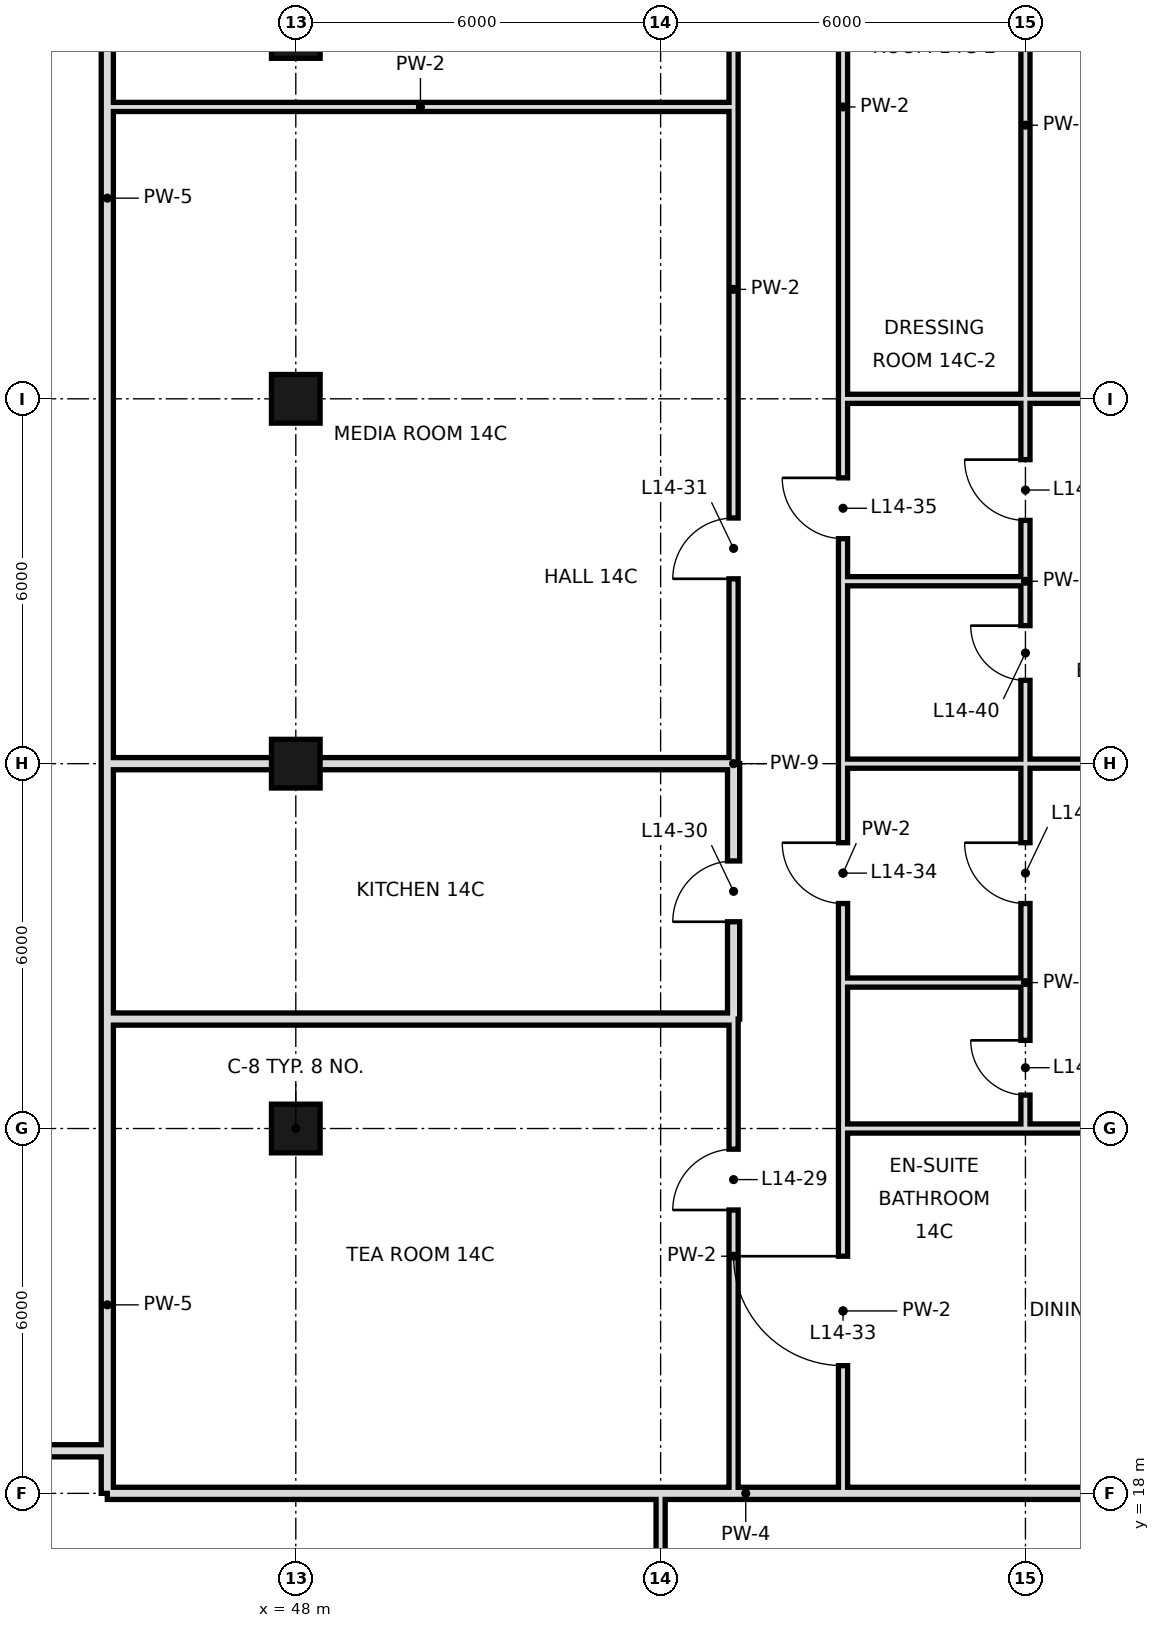
"""IFC4 building model, lengths in metres.
Left out: names, types, materials, properties, quantities, classifications, styles, units other than length and angle.
Written with IfcOpenShell. Run it as: python <this file> out.ifc"""

import sys

from ifc_helpers import new_model, si_unit, direction, frame, frame_2d, origin, origin_2d, place, context, subcontext, project, spatial, rectangle, hollow_rectangle, extrude, element, fill, save


model = new_model("IFC4")
c1 = context("Model", 3, precision=1e-05, world=origin(), true_north=direction((0.0, 1.0)))
c2 = subcontext(c1, "Body", "Model", "MODEL_VIEW")
j1 = project(units=[si_unit("LENGTHUNIT", "METRE"), si_unit("PLANEANGLEUNIT", "RADIAN")], contexts=[c1])
p1 = place(None, origin())
s1 = spatial("IfcSite", under=j1, at=p1, CompositionType="ELEMENT")
p2 = place(p1, origin())
s2 = spatial("IfcBuilding", under=s1, at=p2, CompositionType="ELEMENT")
p3 = place(p2, frame((0.0, 0.0, 71.4)))
s3 = spatial("IfcBuildingStorey", under=s2, at=p3, CompositionType="ELEMENT", Elevation=71.4)
for number, where, z_axis, x_axis in (
    (1, (48.0, 24.0, 0.0), (0.0, 0.0, 1.0), (1.0, 0.0, 0.0)),
    (2, (48.0, 30.0, 0.0), (0.0, 0.0, 1.0), (1.0, 0.0, 0.0)),
    (3, (48.0, 36.0, 0.0), (0.0, 0.0, 1.0), (1.0, 0.0, 0.0)),
    (4, (48.0, 42.0, 0.0), (0.0, 0.0, 1.0), (1.0, 0.0, 0.0)),
):
    element("IfcColumn", number, at=place(p3, frame(where, z_axis=z_axis, x_axis=x_axis)), inside=s3, PredefinedType="COLUMN", context=c2, shape_type="SweptSolid", body=[
        extrude(hollow_rectangle(XDim=0.8, YDim=0.8, WallThickness=0.04, at=origin_2d()), origin(), (0.0, 0.0, 1.0), 3.6),
    ])
p4 = place(p3, frame((44.9, 18.7, 0.0), z_axis=(0.0, 0.0, 1.0), x_axis=(0.0, 1.0, 0.0)))
e5 = element("IfcWall", 5, at=p4, inside=s3, PredefinedType="SOLIDWALL", context=c2, shape_type="SweptSolid", body=[
    extrude(rectangle(XDim=7.1, YDim=0.2, at=frame_2d((3.55, 0.0))), origin(), (0.0, 0.0, 1.0), 3.42),
])
p5 = place(p3, frame((44.9, 30.0, 0.0), z_axis=(0.0, 0.0, 1.0), x_axis=(0.0, 1.0, 0.0)))
e6 = element("IfcWall", 6, at=p5, inside=s3, PredefinedType="SOLIDWALL", context=c2, shape_type="SweptSolid", body=[
    extrude(rectangle(XDim=18.6, YDim=0.2, at=frame_2d((9.3, 0.0))), origin(), (0.0, 0.0, 1.0), 2.72),
])
p6 = place(p5, frame((12.6, 0.0, 0.0)))
e7 = element("IfcOpeningElement", 7, at=p6, cuts=e6, PredefinedType="OPENING", context=c2, shape_type="SweptSolid", body=[
    extrude(rectangle(XDim=1.2, YDim=2.4, at=frame_2d((0.6, 1.2))), frame((0.0, 0.11, 0.0), z_axis=(0.0, -1.0, 0.0), x_axis=(1.0, 0.0, 0.0)), (0.0, 0.0, 1.0), 0.22),
])
p7 = place(p3, frame((44.9, 25.8, 0.0), z_axis=(0.0, 0.0, 1.0), x_axis=(0.0, 1.0, 0.0)))
e8 = element("IfcWall", 8, at=p7, inside=s3, PredefinedType="SOLIDWALL", context=c2, shape_type="SweptSolid", body=[
    extrude(rectangle(XDim=4.2, YDim=0.2, at=frame_2d((2.1, 0.0))), origin(), (0.0, 0.0, 1.0), 2.97),
])
p8 = place(p3, frame((44.9, 18.0, 0.0), z_axis=(0.0, 0.0, 1.0), x_axis=(0.0, 1.0, 0.0)))
e9 = element("IfcWall", 9, at=p8, inside=s3, PredefinedType="SOLIDWALL", context=c2, shape_type="SweptSolid", body=[
    extrude(rectangle(XDim=0.7, YDim=0.2, at=frame_2d((0.35, 0.0))), origin(), (0.0, 0.0, 1.0), 2.97),
])
p9 = place(p3, frame((54.0, 10.8, 0.0), z_axis=(0.0, 0.0, 1.0), x_axis=(0.0, 1.0, 0.0)))
e10 = element("IfcWall", 10, at=p9, inside=s3, PredefinedType="PARTITIONING", context=c2, shape_type="SweptSolid", body=[
    extrude(rectangle(XDim=7.2, YDim=0.15, at=frame_2d((3.6, 0.0))), origin(), (0.0, 0.0, 1.0), 3.42),
])
p10 = place(p3, frame((55.2, 25.8, 0.0), z_axis=(0.0, 0.0, 1.0), x_axis=(0.0, 1.0, 0.0)))
e11 = element("IfcWall", 11, at=p10, inside=s3, PredefinedType="SOLIDWALL", context=c2, shape_type="SweptSolid", body=[
    extrude(rectangle(XDim=4.2, YDim=0.2, at=frame_2d((2.1, 0.0))), origin(), (0.0, 0.0, 1.0), 2.52),
])
p11 = place(p10, frame((1.6, 0.0, 0.0)))
e12 = element("IfcOpeningElement", 12, at=p11, cuts=e11, PredefinedType="OPENING", context=c2, shape_type="SweptSolid", body=[
    extrude(rectangle(XDim=1.0, YDim=2.4, at=frame_2d((0.5, 1.2))), frame((0.0, 0.11, 0.0), z_axis=(0.0, -1.0, 0.0), x_axis=(1.0, 0.0, 0.0)), (0.0, 0.0, 1.0), 0.22),
])
p12 = place(p3, frame((55.2, 18.0, 0.0), z_axis=(0.0, 0.0, 1.0), x_axis=(0.0, 1.0, 0.0)))
e13 = element("IfcWall", 13, at=p12, inside=s3, PredefinedType="PARTITIONING", context=c2, shape_type="SweptSolid", body=[
    extrude(rectangle(XDim=7.8, YDim=0.15, at=frame_2d((3.9, 0.0))), origin(), (0.0, 0.0, 1.0), 3.42),
])
p13 = place(p12, frame((4.66, 0.0, 0.0)))
e14 = element("IfcOpeningElement", 14, at=p13, cuts=e13, PredefinedType="OPENING", context=c2, shape_type="SweptSolid", body=[
    extrude(rectangle(XDim=1.0, YDim=2.4, at=frame_2d((0.5, 1.2))), frame((0.0, 0.085, 0.0), z_axis=(0.0, -1.0, 0.0), x_axis=(1.0, 0.0, 0.0)), (0.0, 0.0, 1.0), 0.17),
])
p14 = place(p3, frame((55.2, 30.0, 0.0), z_axis=(0.0, 0.0, 1.0), x_axis=(0.0, 1.0, 0.0)))
e15 = element("IfcWall", 15, at=p14, inside=s3, PredefinedType="PARTITIONING", context=c2, shape_type="SweptSolid", body=[
    extrude(rectangle(XDim=15.6, YDim=0.15, at=frame_2d((7.8, 0.0))), origin(), (0.0, 0.0, 1.0), 3.42),
])
p15 = place(p14, frame((12.7, 0.0, 0.0)))
e16 = element("IfcOpeningElement", 16, at=p15, cuts=e15, PredefinedType="OPENING", context=c2, shape_type="SweptSolid", body=[
    extrude(rectangle(XDim=1.0, YDim=2.4, at=frame_2d((0.5, 1.2))), frame((0.0, 0.085, 0.0), z_axis=(0.0, -1.0, 0.0), x_axis=(1.0, 0.0, 0.0)), (0.0, 0.0, 1.0), 0.17),
])
p16 = place(p14, frame((3.04, 0.0, 0.0)))
e17 = element("IfcOpeningElement", 17, at=p16, cuts=e15, PredefinedType="OPENING", context=c2, shape_type="SweptSolid", body=[
    extrude(rectangle(XDim=1.0, YDim=2.4, at=frame_2d((0.5, 1.2))), frame((0.0, 0.085, 0.0), z_axis=(0.0, -1.0, 0.0), x_axis=(1.0, 0.0, 0.0)), (0.0, 0.0, 1.0), 0.17),
])
p17 = place(p3, frame((57.0, 18.0, 0.0), z_axis=(0.0, 0.0, 1.0), x_axis=(0.0, 1.0, 0.0)))
e18 = element("IfcWall", 18, at=p17, inside=s3, PredefinedType="PARTITIONING", context=c2, shape_type="SweptSolid", body=[
    extrude(rectangle(XDim=6.0, YDim=0.15, at=frame_2d((3.0, 0.0))), origin(), (0.0, 0.0, 1.0), 3.42),
])
p18 = place(p17, frame((2.1, 0.0, 0.0)))
e19 = element("IfcOpeningElement", 19, at=p18, cuts=e18, PredefinedType="OPENING", context=c2, shape_type="SweptSolid", body=[
    extrude(rectangle(XDim=1.8, YDim=2.4, at=frame_2d((0.9, 1.2))), frame((0.0, 0.085, 0.0), z_axis=(0.0, -1.0, 0.0), x_axis=(1.0, 0.0, 0.0)), (0.0, 0.0, 1.0), 0.17),
])
p19 = place(p3, frame((57.0, 26.4, 0.0), z_axis=(0.0, 0.0, 1.0), x_axis=(0.0, 1.0, 0.0)))
e20 = element("IfcWall", 20, at=p19, inside=s3, PredefinedType="PARTITIONING", context=c2, shape_type="SweptSolid", body=[
    extrude(rectangle(XDim=3.6, YDim=0.15, at=frame_2d((1.8, 0.0))), origin(), (0.0, 0.0, 1.0), 3.42),
])
p20 = place(p19, frame((1.3, 0.0, 0.0)))
e21 = element("IfcOpeningElement", 21, at=p20, cuts=e20, PredefinedType="OPENING", context=c2, shape_type="SweptSolid", body=[
    extrude(rectangle(XDim=1.0, YDim=2.4, at=frame_2d((0.5, 1.2))), frame((0.0, 0.085, 0.0), z_axis=(0.0, -1.0, 0.0), x_axis=(1.0, 0.0, 0.0)), (0.0, 0.0, 1.0), 0.17),
])
p21 = place(p3, frame((57.0, 33.0, 0.0), z_axis=(0.0, 0.0, 1.0), x_axis=(0.0, 1.0, 0.0)))
e22 = element("IfcWall", 22, at=p21, inside=s3, PredefinedType="PARTITIONING", context=c2, shape_type="SweptSolid", body=[
    extrude(rectangle(XDim=15.6, YDim=0.15, at=frame_2d((7.8, 0.0))), origin(), (0.0, 0.0, 1.0), 3.42),
])
p22 = place(p21, frame((0.7, 0.0, 0.0)))
e23 = element("IfcOpeningElement", 23, at=p22, cuts=e22, PredefinedType="OPENING", context=c2, shape_type="SweptSolid", body=[
    extrude(rectangle(XDim=1.0, YDim=2.4, at=frame_2d((0.5, 1.2))), frame((0.0, 0.085, 0.0), z_axis=(0.0, -1.0, 0.0), x_axis=(1.0, 0.0, 0.0)), (0.0, 0.0, 1.0), 0.17),
])
p23 = place(p21, frame((10.04, 0.0, 0.0)))
e24 = element("IfcOpeningElement", 24, at=p23, cuts=e22, PredefinedType="OPENING", context=c2, shape_type="SweptSolid", body=[
    extrude(rectangle(XDim=1.8, YDim=2.4, at=frame_2d((0.9, 1.2))), frame((0.0, 0.085, 0.0), z_axis=(0.0, -1.0, 0.0), x_axis=(1.0, 0.0, 0.0)), (0.0, 0.0, 1.0), 0.17),
])
p24 = place(p3, frame((57.0, 24.0, 0.0), z_axis=(0.0, 0.0, 1.0), x_axis=(0.0, 1.0, 0.0)))
e25 = element("IfcWall", 25, at=p24, inside=s3, PredefinedType="PARTITIONING", context=c2, shape_type="SweptSolid", body=[
    extrude(rectangle(XDim=2.4, YDim=0.15, at=frame_2d((1.2, 0.0))), origin(), (0.0, 0.0, 1.0), 3.42),
])
p25 = place(p3, frame((57.0, 30.0, 0.0), z_axis=(0.0, 0.0, 1.0), x_axis=(0.0, 1.0, 0.0)))
e26 = element("IfcWall", 26, at=p25, inside=s3, PredefinedType="PARTITIONING", context=c2, shape_type="SweptSolid", body=[
    extrude(rectangle(XDim=3.0, YDim=0.15, at=frame_2d((1.5, 0.0))), origin(), (0.0, 0.0, 1.0), 3.42),
])
p26 = place(p3, frame((60.0, 26.4, 0.0), z_axis=(0.0, 0.0, 1.0), x_axis=(0.0, 1.0, 0.0)))
e27 = element("IfcWall", 27, at=p26, inside=s3, PredefinedType="PARTITIONING", context=c2, shape_type="SweptSolid", body=[
    extrude(rectangle(XDim=3.6, YDim=0.15, at=frame_2d((1.8, 0.0))), origin(), (0.0, 0.0, 1.0), 3.42),
])
p27 = place(p26, frame((1.3, 0.0, 0.0)))
e28 = element("IfcOpeningElement", 28, at=p27, cuts=e27, PredefinedType="OPENING", context=c2, shape_type="SweptSolid", body=[
    extrude(rectangle(XDim=1.0, YDim=2.4, at=frame_2d((0.5, 1.2))), frame((0.0, 0.085, 0.0), z_axis=(0.0, -1.0, 0.0), x_axis=(1.0, 0.0, 0.0)), (0.0, 0.0, 1.0), 0.17),
])
p28 = place(p3, frame((60.0, 33.0, 0.0), z_axis=(0.0, 0.0, 1.0), x_axis=(0.0, 1.0, 0.0)))
e29 = element("IfcWall", 29, at=p28, inside=s3, PredefinedType="PARTITIONING", context=c2, shape_type="SweptSolid", body=[
    extrude(rectangle(XDim=15.0, YDim=0.15, at=frame_2d((7.5, 0.0))), origin(), (0.0, 0.0, 1.0), 3.42),
])
p29 = place(p28, frame((1.0, 0.0, 0.0)))
e30 = element("IfcOpeningElement", 30, at=p29, cuts=e29, PredefinedType="OPENING", context=c2, shape_type="SweptSolid", body=[
    extrude(rectangle(XDim=1.0, YDim=2.4, at=frame_2d((0.5, 1.2))), frame((0.0, 0.085, 0.0), z_axis=(0.0, -1.0, 0.0), x_axis=(1.0, 0.0, 0.0)), (0.0, 0.0, 1.0), 0.17),
])
p30 = place(p28, frame((10.04, 0.0, 0.0)))
e31 = element("IfcOpeningElement", 31, at=p30, cuts=e29, PredefinedType="OPENING", context=c2, shape_type="SweptSolid", body=[
    extrude(rectangle(XDim=1.8, YDim=2.4, at=frame_2d((0.9, 1.2))), frame((0.0, 0.085, 0.0), z_axis=(0.0, -1.0, 0.0), x_axis=(1.0, 0.0, 0.0)), (0.0, 0.0, 1.0), 0.17),
])
p31 = place(p3, frame((60.0, 24.0, 0.0), z_axis=(0.0, 0.0, 1.0), x_axis=(0.0, 1.0, 0.0)))
e32 = element("IfcWall", 32, at=p31, inside=s3, PredefinedType="PARTITIONING", context=c2, shape_type="SweptSolid", body=[
    extrude(rectangle(XDim=2.4, YDim=0.15, at=frame_2d((1.2, 0.0))), origin(), (0.0, 0.0, 1.0), 3.42),
])
p32 = place(p31, frame((0.55, 0.0, 0.0)))
e33 = element("IfcOpeningElement", 33, at=p32, cuts=e32, PredefinedType="OPENING", context=c2, shape_type="SweptSolid", body=[
    extrude(rectangle(XDim=0.9, YDim=2.4, at=frame_2d((0.45, 1.2))), frame((0.0, 0.085, 0.0), z_axis=(0.0, -1.0, 0.0), x_axis=(1.0, 0.0, 0.0)), (0.0, 0.0, 1.0), 0.17),
])
p33 = place(p3, frame((60.0, 30.0, 0.0), z_axis=(0.0, 0.0, 1.0), x_axis=(0.0, 1.0, 0.0)))
e34 = element("IfcWall", 34, at=p33, inside=s3, PredefinedType="PARTITIONING", context=c2, shape_type="SweptSolid", body=[
    extrude(rectangle(XDim=3.0, YDim=0.15, at=frame_2d((1.5, 0.0))), origin(), (0.0, 0.0, 1.0), 3.42),
])
p34 = place(p33, frame((1.37, 0.0, 0.0)))
e35 = element("IfcOpeningElement", 35, at=p34, cuts=e34, PredefinedType="OPENING", context=c2, shape_type="SweptSolid", body=[
    extrude(rectangle(XDim=0.9, YDim=2.4, at=frame_2d((0.45, 1.2))), frame((0.0, 0.085, 0.0), z_axis=(0.0, -1.0, 0.0), x_axis=(1.0, 0.0, 0.0)), (0.0, 0.0, 1.0), 0.17),
])
p35 = place(p3, frame((44.9, 18.0, 0.0), z_axis=(0.0, 0.0, 1.0), x_axis=(1.0, 0.0, 0.0)))
e36 = element("IfcWall", 36, at=p35, inside=s3, PredefinedType="SOLIDWALL", context=c2, shape_type="SweptSolid", body=[
    extrude(rectangle(XDim=21.7, YDim=0.2, at=frame_2d((10.85, 0.0))), origin(), (0.0, 0.0, 1.0), 2.52),
])
p36 = place(p3, frame((42.6, 18.7, 0.0), z_axis=(0.0, 0.0, 1.0), x_axis=(1.0, 0.0, 0.0)))
e37 = element("IfcWall", 37, at=p36, inside=s3, PredefinedType="SOLIDWALL", context=c2, shape_type="SweptSolid", body=[
    extrude(rectangle(XDim=2.3, YDim=0.2, at=frame_2d((1.15, 0.0))), origin(), (0.0, 0.0, 1.0), 3.42),
])
p37 = place(p3, frame((60.0, 24.0, 0.0), z_axis=(0.0, 0.0, 1.0), x_axis=(1.0, 0.0, 0.0)))
e38 = element("IfcWall", 38, at=p37, inside=s3, PredefinedType="PARTITIONING", context=c2, shape_type="SweptSolid", body=[
    extrude(rectangle(XDim=6.0, YDim=0.15, at=frame_2d((3.0, 0.0))), origin(), (0.0, 0.0, 1.0), 2.52),
])
p38 = place(p3, frame((57.0, 24.0, 0.0), z_axis=(0.0, 0.0, 1.0), x_axis=(1.0, 0.0, 0.0)))
e39 = element("IfcWall", 39, at=p38, inside=s3, PredefinedType="PARTITIONING", context=c2, shape_type="SweptSolid", body=[
    extrude(rectangle(XDim=3.0, YDim=0.15, at=frame_2d((1.5, 0.0))), origin(), (0.0, 0.0, 1.0), 2.52),
])
p39 = place(p3, frame((44.9, 25.8, 0.0), z_axis=(0.0, 0.0, 1.0), x_axis=(1.0, 0.0, 0.0)))
e40 = element("IfcWall", 40, at=p39, inside=s3, PredefinedType="SOLIDWALL", context=c2, shape_type="SweptSolid", body=[
    extrude(rectangle(XDim=10.3, YDim=0.2, at=frame_2d((5.15, 0.0))), origin(), (0.0, 0.0, 1.0), 2.97),
])
p40 = place(p3, frame((57.0, 26.4, 0.0), z_axis=(0.0, 0.0, 1.0), x_axis=(1.0, 0.0, 0.0)))
e41 = element("IfcWall", 41, at=p40, inside=s3, PredefinedType="PARTITIONING", context=c2, shape_type="SweptSolid", body=[
    extrude(rectangle(XDim=3.0, YDim=0.15, at=frame_2d((1.5, 0.0))), origin(), (0.0, 0.0, 1.0), 3.42),
])
p41 = place(p3, frame((44.9, 30.0, 0.0), z_axis=(0.0, 0.0, 1.0), x_axis=(1.0, 0.0, 0.0)))
e42 = element("IfcWall", 42, at=p41, inside=s3, PredefinedType="SOLIDWALL", context=c2, shape_type="SweptSolid", body=[
    extrude(rectangle(XDim=10.3, YDim=0.2, at=frame_2d((5.15, 0.0))), origin(), (0.0, 0.0, 1.0), 2.52),
])
p42 = place(p3, frame((60.0, 30.0, 0.0), z_axis=(0.0, 0.0, 1.0), x_axis=(1.0, 0.0, 0.0)))
e43 = element("IfcWall", 43, at=p42, inside=s3, PredefinedType="PARTITIONING", context=c2, shape_type="SweptSolid", body=[
    extrude(rectangle(XDim=6.6, YDim=0.15, at=frame_2d((3.3, 0.0))), origin(), (0.0, 0.0, 1.0), 2.52),
])
p43 = place(p3, frame((57.0, 30.0, 0.0), z_axis=(0.0, 0.0, 1.0), x_axis=(1.0, 0.0, 0.0)))
e44 = element("IfcWall", 44, at=p43, inside=s3, PredefinedType="PARTITIONING", context=c2, shape_type="SweptSolid", body=[
    extrude(rectangle(XDim=3.0, YDim=0.15, at=frame_2d((1.5, 0.0))), origin(), (0.0, 0.0, 1.0), 2.52),
])
p44 = place(p3, frame((57.0, 33.0, 0.0), z_axis=(0.0, 0.0, 1.0), x_axis=(1.0, 0.0, 0.0)))
e45 = element("IfcWall", 45, at=p44, inside=s3, PredefinedType="PARTITIONING", context=c2, shape_type="SweptSolid", body=[
    extrude(rectangle(XDim=3.0, YDim=0.15, at=frame_2d((1.5, 0.0))), origin(), (0.0, 0.0, 1.0), 3.42),
])
p45 = place(p3, frame((57.0, 36.0, 0.0), z_axis=(0.0, 0.0, 1.0), x_axis=(1.0, 0.0, 0.0)))
e46 = element("IfcWall", 46, at=p45, inside=s3, PredefinedType="PARTITIONING", context=c2, shape_type="SweptSolid", body=[
    extrude(rectangle(XDim=9.0, YDim=0.15, at=frame_2d((4.5, 0.0))), origin(), (0.0, 0.0, 1.0), 2.52),
])
p46 = place(p3, frame((44.9, 40.8, 0.0), z_axis=(0.0, 0.0, 1.0), x_axis=(1.0, 0.0, 0.0)))
e47 = element("IfcWall", 47, at=p46, inside=s3, PredefinedType="PARTITIONING", context=c2, shape_type="SweptSolid", body=[
    extrude(rectangle(XDim=10.3, YDim=0.15, at=frame_2d((5.15, 0.0))), origin(), (0.0, 0.0, 1.0), 3.42),
])
p47 = place(p13, origin())
e48 = element("IfcDoor", 48, at=p47, inside=s3, OperationType="SINGLE_SWING_LEFT", PredefinedType="DOOR", context=c2, shape_type="SweptSolid", body=[
    extrude(rectangle(XDim=1.0, YDim=2.4, at=frame_2d((0.5, 1.2))), frame((0.0, 0.025, 0.0), z_axis=(0.0, -1.0, 0.0), x_axis=(1.0, 0.0, 0.0)), (0.0, 0.0, 1.0), 0.05),
])
fill(e14, e48)
p48 = place(p11, origin())
e49 = element("IfcDoor", 49, at=p48, inside=s3, OperationType="SINGLE_SWING_LEFT", PredefinedType="DOOR", context=c2, shape_type="SweptSolid", body=[
    extrude(rectangle(XDim=1.0, YDim=2.4, at=frame_2d((0.5, 1.2))), frame((0.0, 0.025, 0.0), z_axis=(0.0, -1.0, 0.0), x_axis=(1.0, 0.0, 0.0)), (0.0, 0.0, 1.0), 0.05),
])
fill(e12, e49)
p49 = place(p16, origin())
e50 = element("IfcDoor", 50, at=p49, inside=s3, OperationType="SINGLE_SWING_LEFT", PredefinedType="DOOR", context=c2, shape_type="SweptSolid", body=[
    extrude(rectangle(XDim=1.0, YDim=2.4, at=frame_2d((0.5, 1.2))), frame((0.0, 0.025, 0.0), z_axis=(0.0, -1.0, 0.0), x_axis=(1.0, 0.0, 0.0)), (0.0, 0.0, 1.0), 0.05),
])
fill(e17, e50)
p50 = place(p18, frame((1.8, 0.0, 0.0), z_axis=(0.0, 0.0, 1.0), x_axis=(-1.0, 0.0, 0.0)))
e51 = element("IfcDoor", 51, at=p50, inside=s3, OperationType="SINGLE_SWING_LEFT", PredefinedType="DOOR", context=c2, shape_type="SweptSolid", body=[
    extrude(rectangle(XDim=1.8, YDim=2.4, at=frame_2d((0.9, 1.2))), frame((0.0, 0.025, 0.0), z_axis=(0.0, -1.0, 0.0), x_axis=(1.0, 0.0, 0.0)), (0.0, 0.0, 1.0), 0.05),
])
fill(e19, e51)
p51 = place(p20, frame((1.0, 0.0, 0.0), z_axis=(0.0, 0.0, 1.0), x_axis=(-1.0, 0.0, 0.0)))
e52 = element("IfcDoor", 52, at=p51, inside=s3, OperationType="SINGLE_SWING_LEFT", PredefinedType="DOOR", context=c2, shape_type="SweptSolid", body=[
    extrude(rectangle(XDim=1.0, YDim=2.4, at=frame_2d((0.5, 1.2))), frame((0.0, 0.025, 0.0), z_axis=(0.0, -1.0, 0.0), x_axis=(1.0, 0.0, 0.0)), (0.0, 0.0, 1.0), 0.05),
])
fill(e21, e52)
p52 = place(p22, frame((1.0, 0.0, 0.0), z_axis=(0.0, 0.0, 1.0), x_axis=(-1.0, 0.0, 0.0)))
e53 = element("IfcDoor", 53, at=p52, inside=s3, OperationType="SINGLE_SWING_LEFT", PredefinedType="DOOR", context=c2, shape_type="SweptSolid", body=[
    extrude(rectangle(XDim=1.0, YDim=2.4, at=frame_2d((0.5, 1.2))), frame((0.0, 0.025, 0.0), z_axis=(0.0, -1.0, 0.0), x_axis=(1.0, 0.0, 0.0)), (0.0, 0.0, 1.0), 0.05),
])
fill(e23, e53)
p53 = place(p27, frame((1.0, 0.0, 0.0), z_axis=(0.0, 0.0, 1.0), x_axis=(-1.0, 0.0, 0.0)))
e54 = element("IfcDoor", 54, at=p53, inside=s3, OperationType="SINGLE_SWING_LEFT", PredefinedType="DOOR", context=c2, shape_type="SweptSolid", body=[
    extrude(rectangle(XDim=1.0, YDim=2.4, at=frame_2d((0.5, 1.2))), frame((0.0, 0.025, 0.0), z_axis=(0.0, -1.0, 0.0), x_axis=(1.0, 0.0, 0.0)), (0.0, 0.0, 1.0), 0.05),
])
fill(e28, e54)
p54 = place(p32, frame((0.9, 0.0, 0.0), z_axis=(0.0, 0.0, 1.0), x_axis=(-1.0, 0.0, 0.0)))
e55 = element("IfcDoor", 55, at=p54, inside=s3, OperationType="SINGLE_SWING_LEFT", PredefinedType="DOOR", context=c2, shape_type="SweptSolid", body=[
    extrude(rectangle(XDim=0.9, YDim=2.4, at=frame_2d((0.45, 1.2))), frame((0.0, 0.025, 0.0), z_axis=(0.0, -1.0, 0.0), x_axis=(1.0, 0.0, 0.0)), (0.0, 0.0, 1.0), 0.05),
])
fill(e33, e55)
p55 = place(p29, frame((1.0, 0.0, 0.0), z_axis=(0.0, 0.0, 1.0), x_axis=(-1.0, 0.0, 0.0)))
e56 = element("IfcDoor", 56, at=p55, inside=s3, OperationType="SINGLE_SWING_LEFT", PredefinedType="DOOR", context=c2, shape_type="SweptSolid", body=[
    extrude(rectangle(XDim=1.0, YDim=2.4, at=frame_2d((0.5, 1.2))), frame((0.0, 0.025, 0.0), z_axis=(0.0, -1.0, 0.0), x_axis=(1.0, 0.0, 0.0)), (0.0, 0.0, 1.0), 0.05),
])
fill(e30, e56)
p56 = place(p34, frame((0.9, 0.0, 0.0), z_axis=(0.0, 0.0, 1.0), x_axis=(-1.0, 0.0, 0.0)))
e57 = element("IfcDoor", 57, at=p56, inside=s3, OperationType="SINGLE_SWING_LEFT", PredefinedType="DOOR", context=c2, shape_type="SweptSolid", body=[
    extrude(rectangle(XDim=0.9, YDim=2.4, at=frame_2d((0.45, 1.2))), frame((0.0, 0.025, 0.0), z_axis=(0.0, -1.0, 0.0), x_axis=(1.0, 0.0, 0.0)), (0.0, 0.0, 1.0), 0.05),
])
fill(e35, e57)
save(model, sys.argv[1])
